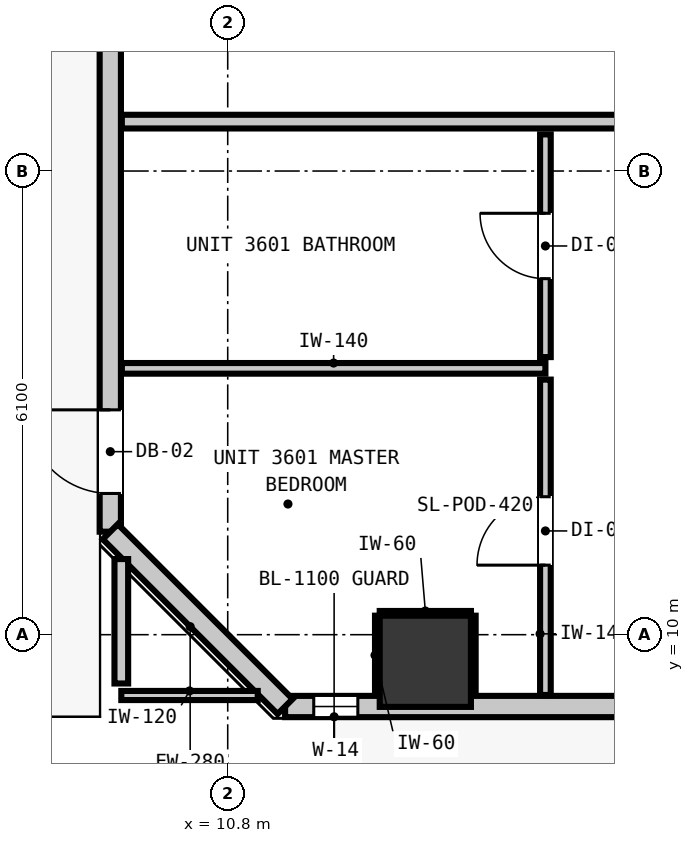
"""IFC4 building model, lengths in metres.
Left out: names, types, materials, properties, quantities, classifications, styles, units other than length and angle.
Written with IfcOpenShell. Run it as: python <this file> out.ifc"""

import sys

from ifc_helpers import new_model, si_unit, direction, frame, frame_2d, origin, origin_2d, place, context, subcontext, project, spatial, rectangle, extrude, element, fill, save


model = new_model("IFC4")
c1 = context("Model", 3, precision=1e-05, world=origin(), true_north=direction((0.0, 1.0)))
c2 = subcontext(c1, "Body", "Model", "MODEL_VIEW")
j1 = project(units=[si_unit("LENGTHUNIT", "METRE"), si_unit("PLANEANGLEUNIT", "RADIAN")], contexts=[c1])
p1 = place(None, origin())
s1 = spatial("IfcSite", under=j1, at=p1, CompositionType="ELEMENT")
p2 = place(p1, origin())
s2 = spatial("IfcBuilding", under=s1, at=p2, CompositionType="ELEMENT")
p3 = place(p2, frame((0.0, 0.0, 126.0)))
s3 = spatial("IfcBuildingStorey", under=s2, at=p3, CompositionType="ELEMENT", Elevation=126.0)
p4 = place(p3, frame((13.4, 9.65, -0.2), z_axis=(0.0, 0.0, 1.0), x_axis=(1.0, 0.0, 0.0)))
e1 = element("IfcColumn", 1, at=p4, inside=s3, PredefinedType="COLUMN", context=c2, shape_type="SweptSolid", body=[
    extrude(rectangle(XDim=1.2, YDim=1.2, at=origin_2d()), origin(), (0.0, 0.0, 1.0), 3.52),
])
p5 = place(p3, frame((9.255, 11.355, 0.0), z_axis=(0.0, 0.0, 1.0), x_axis=(0.0, 1.0, 0.0)))
e2 = element("IfcWall", 2, at=p5, inside=s3, PredefinedType="STANDARD", context=c2, shape_type="SweptSolid", body=[
    extrude(rectangle(XDim=32.29, YDim=0.28, at=frame_2d((16.145, 0.0))), origin(), (0.0, 0.0, 1.0), 3.08),
])
p6 = place(p5, frame((0.503, 0.0, 0.0)))
e3 = element("IfcOpeningElement", 3, at=p6, cuts=e2, PredefinedType="OPENING", context=c2, shape_type="SweptSolid", body=[
    extrude(rectangle(XDim=1.1, YDim=2.15, at=frame_2d((0.55, 1.075))), frame((0.0, 0.15, 0.0), z_axis=(0.0, -1.0, 0.0), x_axis=(1.0, 0.0, 0.0)), (0.0, 0.0, 1.0), 0.3),
])
p7 = place(p3, frame((46.645, 9.055, 0.0), z_axis=(0.0, 0.0, 1.0), x_axis=(-1.0, 0.0, 0.0)))
e4 = element("IfcWall", 4, at=p7, inside=s3, PredefinedType="STANDARD", context=c2, shape_type="SweptSolid", body=[
    extrude(rectangle(XDim=35.09, YDim=0.28, at=frame_2d((17.545, 0.0))), origin(), (0.0, 0.0, 1.0), 3.08),
])
p8 = place(p7, frame((2.307, 0.0, 0.0)))
e5 = element("IfcOpeningElement", 5, at=p8, cuts=e4, PredefinedType="OPENING", context=c2, shape_type="SweptSolid", body=[
    extrude(rectangle(XDim=1.0, YDim=2.15, at=frame_2d((0.5, 1.075))), frame((0.0, 0.15, 0.0), z_axis=(0.0, -1.0, 0.0), x_axis=(1.0, 0.0, 0.0)), (0.0, 0.0, 1.0), 0.3),
])
p9 = place(p7, frame((28.795, 0.0, 0.85)))
e6 = element("IfcOpeningElement", 6, at=p9, cuts=e4, PredefinedType="OPENING", context=c2, shape_type="SweptSolid", body=[
    extrude(rectangle(XDim=1.5, YDim=1.8, at=frame_2d((0.75, 0.9))), frame((0.0, 0.15, 0.0), z_axis=(0.0, -1.0, 0.0), x_axis=(1.0, 0.0, 0.0)), (0.0, 0.0, 1.0), 0.3),
])
p10 = place(p7, frame((34.133, 0.0, 0.85)))
e7 = element("IfcOpeningElement", 7, at=p10, cuts=e4, PredefinedType="OPENING", context=c2, shape_type="SweptSolid", body=[
    extrude(rectangle(XDim=0.58, YDim=1.5, at=frame_2d((0.29, 0.75))), frame((0.0, 0.15, 0.0), z_axis=(0.0, -1.0, 0.0), x_axis=(1.0, 0.0, 0.0)), (0.0, 0.0, 1.0), 0.3),
])
p11 = place(p7, frame((15.118, 0.0, 0.85)))
e8 = element("IfcOpeningElement", 8, at=p11, cuts=e4, PredefinedType="OPENING", context=c2, shape_type="SweptSolid", body=[
    extrude(rectangle(XDim=1.5, YDim=1.8, at=frame_2d((0.75, 0.9))), frame((0.0, 0.15, 0.0), z_axis=(0.0, -1.0, 0.0), x_axis=(1.0, 0.0, 0.0)), (0.0, 0.0, 1.0), 0.3),
])
p12 = place(p7, frame((20.357, 0.0, 0.85)))
e9 = element("IfcOpeningElement", 9, at=p12, cuts=e4, PredefinedType="OPENING", context=c2, shape_type="SweptSolid", body=[
    extrude(rectangle(XDim=1.5, YDim=1.8, at=frame_2d((0.75, 0.9))), frame((0.0, 0.15, 0.0), z_axis=(0.0, -1.0, 0.0), x_axis=(1.0, 0.0, 0.0)), (0.0, 0.0, 1.0), 0.3),
])
p13 = place(p7, frame((4.699, 0.0, 0.85)))
e10 = element("IfcOpeningElement", 10, at=p13, cuts=e4, PredefinedType="OPENING", context=c2, shape_type="SweptSolid", body=[
    extrude(rectangle(XDim=1.5, YDim=1.8, at=frame_2d((0.75, 0.9))), frame((0.0, 0.15, 0.0), z_axis=(0.0, -1.0, 0.0), x_axis=(1.0, 0.0, 0.0)), (0.0, 0.0, 1.0), 0.3),
])
p14 = place(p7, frame((7.818, 0.0, 0.85)))
e11 = element("IfcOpeningElement", 11, at=p14, cuts=e4, PredefinedType="OPENING", context=c2, shape_type="SweptSolid", body=[
    extrude(rectangle(XDim=1.5, YDim=1.8, at=frame_2d((0.75, 0.9))), frame((0.0, 0.15, 0.0), z_axis=(0.0, -1.0, 0.0), x_axis=(1.0, 0.0, 0.0)), (0.0, 0.0, 1.0), 0.3),
])
p15 = place(p3, frame((11.555, 9.055, 0.0), z_axis=(0.0, 0.0, 1.0), x_axis=(-0.707106781187, 0.707106781187, 0.0)))
e12 = element("IfcWall", 12, at=p15, inside=s3, PredefinedType="STANDARD", context=c2, shape_type="SweptSolid", body=[
    extrude(rectangle(XDim=3.253, YDim=0.28, at=frame_2d((1.626, 0.0))), origin(), (0.0, 0.0, 1.0), 3.08),
])
p16 = place(p3, frame((9.407, 16.75, 0.0), z_axis=(0.0, 0.0, 1.0), x_axis=(1.0, 0.0, 0.0)))
e13 = element("IfcWall", 13, at=p16, inside=s3, PredefinedType="PARTITIONING", context=c2, shape_type="SweptSolid", body=[
    extrude(rectangle(XDim=39.386, YDim=0.18, at=frame_2d((19.693, 0.0))), origin(), (0.0, 0.0, 1.0), 3.08),
])
p17 = place(p16, frame((7.193, 0.0, 0.0)))
e14 = element("IfcOpeningElement", 14, at=p17, cuts=e13, PredefinedType="OPENING", context=c2, shape_type="SweptSolid", body=[
    extrude(rectangle(XDim=1.0, YDim=2.15, at=frame_2d((0.5, 1.075))), frame((0.0, 0.1, 0.0), z_axis=(0.0, -1.0, 0.0), x_axis=(1.0, 0.0, 0.0)), (0.0, 0.0, 1.0), 0.2),
])
p18 = place(p16, frame((19.64, 0.0, 0.0)))
e15 = element("IfcOpeningElement", 15, at=p18, cuts=e13, PredefinedType="OPENING", context=c2, shape_type="SweptSolid", body=[
    extrude(rectangle(XDim=1.0, YDim=2.15, at=frame_2d((0.5, 1.075))), frame((0.0, 0.1, 0.0), z_axis=(0.0, -1.0, 0.0), x_axis=(1.0, 0.0, 0.0)), (0.0, 0.0, 1.0), 0.2),
])
p19 = place(p16, frame((32.183, 0.0, 0.0)))
e16 = element("IfcOpeningElement", 16, at=p19, cuts=e13, PredefinedType="OPENING", context=c2, shape_type="SweptSolid", body=[
    extrude(rectangle(XDim=1.0, YDim=2.15, at=frame_2d((0.5, 1.075))), frame((0.0, 0.1, 0.0), z_axis=(0.0, -1.0, 0.0), x_axis=(1.0, 0.0, 0.0)), (0.0, 0.0, 1.0), 0.2),
])
p20 = place(p3, frame((9.407, 13.504, 0.0), z_axis=(0.0, 0.0, 1.0), x_axis=(1.0, 0.0, 0.0)))
e17 = element("IfcWall", 17, at=p20, inside=s3, PredefinedType="PARTITIONING", context=c2, shape_type="SweptSolid", body=[
    extrude(rectangle(XDim=5.573, YDim=0.14, at=frame_2d((2.787, 0.0))), origin(), (0.0, 0.0, 1.0), 3.08),
])
p21 = place(p3, frame((9.4, 9.2, 0.0), z_axis=(0.0, 0.0, 1.0), x_axis=(1.0, 0.0, 0.0)))
e18 = element("IfcWall", 18, at=p21, inside=s3, PredefinedType="PARTITIONING", context=c2, shape_type="SweptSolid", body=[
    extrude(rectangle(XDim=1.795, YDim=0.12, at=frame_2d((0.897, 0.0))), origin(), (0.0, 0.0, 1.0), 3.08),
])
p22 = place(p3, frame((9.4, 9.358, 0.0), z_axis=(0.0, 0.0, 1.0), x_axis=(0.0, 1.0, 0.0)))
e19 = element("IfcWall", 19, at=p22, inside=s3, PredefinedType="PARTITIONING", context=c2, shape_type="SweptSolid", body=[
    extrude(rectangle(XDim=1.637, YDim=0.18, at=frame_2d((0.819, 0.0))), origin(), (0.0, 0.0, 1.0), 3.08),
])
p23 = place(p3, frame((14.98, 9.207, 0.0), z_axis=(0.0, 0.0, 1.0), x_axis=(0.0, 1.0, 0.0)))
e20 = element("IfcWall", 20, at=p23, inside=s3, PredefinedType="PARTITIONING", context=c2, shape_type="SweptSolid", body=[
    extrude(rectangle(XDim=4.149, YDim=0.14, at=frame_2d((2.074, 0.0))), origin(), (0.0, 0.0, 1.0), 3.08),
])
p24 = place(p23, frame((1.708, 0.0, 0.0)))
e21 = element("IfcOpeningElement", 21, at=p24, cuts=e20, PredefinedType="OPENING", context=c2, shape_type="SweptSolid", body=[
    extrude(rectangle(XDim=0.9, YDim=2.1, at=frame_2d((0.45, 1.05))), frame((0.0, 0.08, 0.0), z_axis=(0.0, -1.0, 0.0), x_axis=(1.0, 0.0, 0.0)), (0.0, 0.0, 1.0), 0.16),
])
p25 = place(p3, frame((14.98, 13.652, 0.0), z_axis=(0.0, 0.0, 1.0), x_axis=(0.0, 1.0, 0.0)))
e22 = element("IfcWall", 22, at=p25, inside=s3, PredefinedType="PARTITIONING", context=c2, shape_type="SweptSolid", body=[
    extrude(rectangle(XDim=2.93, YDim=0.14, at=frame_2d((1.465, 0.0))), origin(), (0.0, 0.0, 1.0), 3.08),
])
p26 = place(p25, frame((1.032, 0.0, 0.0)))
e23 = element("IfcOpeningElement", 23, at=p26, cuts=e22, PredefinedType="OPENING", context=c2, shape_type="SweptSolid", body=[
    extrude(rectangle(XDim=0.86, YDim=2.02, at=frame_2d((0.43, 1.01))), frame((0.0, 0.08, 0.0), z_axis=(0.0, -1.0, 0.0), x_axis=(1.0, 0.0, 0.0)), (0.0, 0.0, 1.0), 0.16),
])
p27 = place(p3, frame((12.8, 10.282, 0.0), z_axis=(0.0, 0.0, 1.0), x_axis=(1.0, 0.0, 0.0)))
e24 = element("IfcWall", 24, at=p27, inside=s3, PredefinedType="PARTITIONING", context=c2, shape_type="SweptSolid", body=[
    extrude(rectangle(XDim=1.2, YDim=0.06, at=frame_2d((0.6, 0.0))), origin(), (0.0, 0.0, 1.0), 1.45),
])
for number, where, z_axis, x_axis in (
    (25, (12.768, 9.21, 0.0), (0.0, 0.0, 1.0), (0.0, 1.0, 0.0)),
    (26, (14.032, 9.21, 0.0), (0.0, 0.0, 1.0), (0.0, 1.0, 0.0)),
):
    element("IfcWall", number, at=place(p3, frame(where, z_axis=z_axis, x_axis=x_axis)), inside=s3, PredefinedType="PARTITIONING", context=c2, shape_type="SweptSolid", body=[
        extrude(rectangle(XDim=1.04, YDim=0.06, at=frame_2d((0.52, 0.0))), origin(), (0.0, 0.0, 1.0), 1.45),
    ])
p28 = place(p6, origin())
e27 = element("IfcDoor", 27, at=p28, inside=s3, OperationType="SINGLE_SWING_RIGHT", PredefinedType="DOOR", context=c2, shape_type="SweptSolid", body=[
    extrude(rectangle(XDim=1.1, YDim=2.15, at=frame_2d((0.55, 1.075))), frame((0.0, 0.025, 0.0), z_axis=(0.0, -1.0, 0.0), x_axis=(1.0, 0.0, 0.0)), (0.0, 0.0, 1.0), 0.05),
])
fill(e3, e27)
p29 = place(p10, origin())
e28 = element("IfcWindow", 28, at=p29, inside=s3, PartitioningType="SINGLE_PANEL", PredefinedType="WINDOW", context=c2, shape_type="SweptSolid", body=[
    extrude(rectangle(XDim=0.58, YDim=1.5, at=frame_2d((0.29, 0.75))), frame((0.0, 0.03, 0.0), z_axis=(0.0, -1.0, 0.0), x_axis=(1.0, 0.0, 0.0)), (0.0, 0.0, 1.0), 0.06),
])
fill(e7, e28)
p30 = place(p26, origin())
e29 = element("IfcDoor", 29, at=p30, inside=s3, OperationType="SINGLE_SWING_RIGHT", PredefinedType="DOOR", context=c2, shape_type="SweptSolid", body=[
    extrude(rectangle(XDim=0.86, YDim=2.02, at=frame_2d((0.43, 1.01))), frame((0.0, 0.025, 0.0), z_axis=(0.0, -1.0, 0.0), x_axis=(1.0, 0.0, 0.0)), (0.0, 0.0, 1.0), 0.05),
])
fill(e23, e29)
p31 = place(p24, origin())
e30 = element("IfcDoor", 30, at=p31, inside=s3, OperationType="SINGLE_SWING_LEFT", PredefinedType="DOOR", context=c2, shape_type="SweptSolid", body=[
    extrude(rectangle(XDim=0.9, YDim=2.1, at=frame_2d((0.45, 1.05))), frame((0.0, 0.025, 0.0), z_axis=(0.0, -1.0, 0.0), x_axis=(1.0, 0.0, 0.0)), (0.0, 0.0, 1.0), 0.05),
])
fill(e21, e30)
save(model, sys.argv[1])
